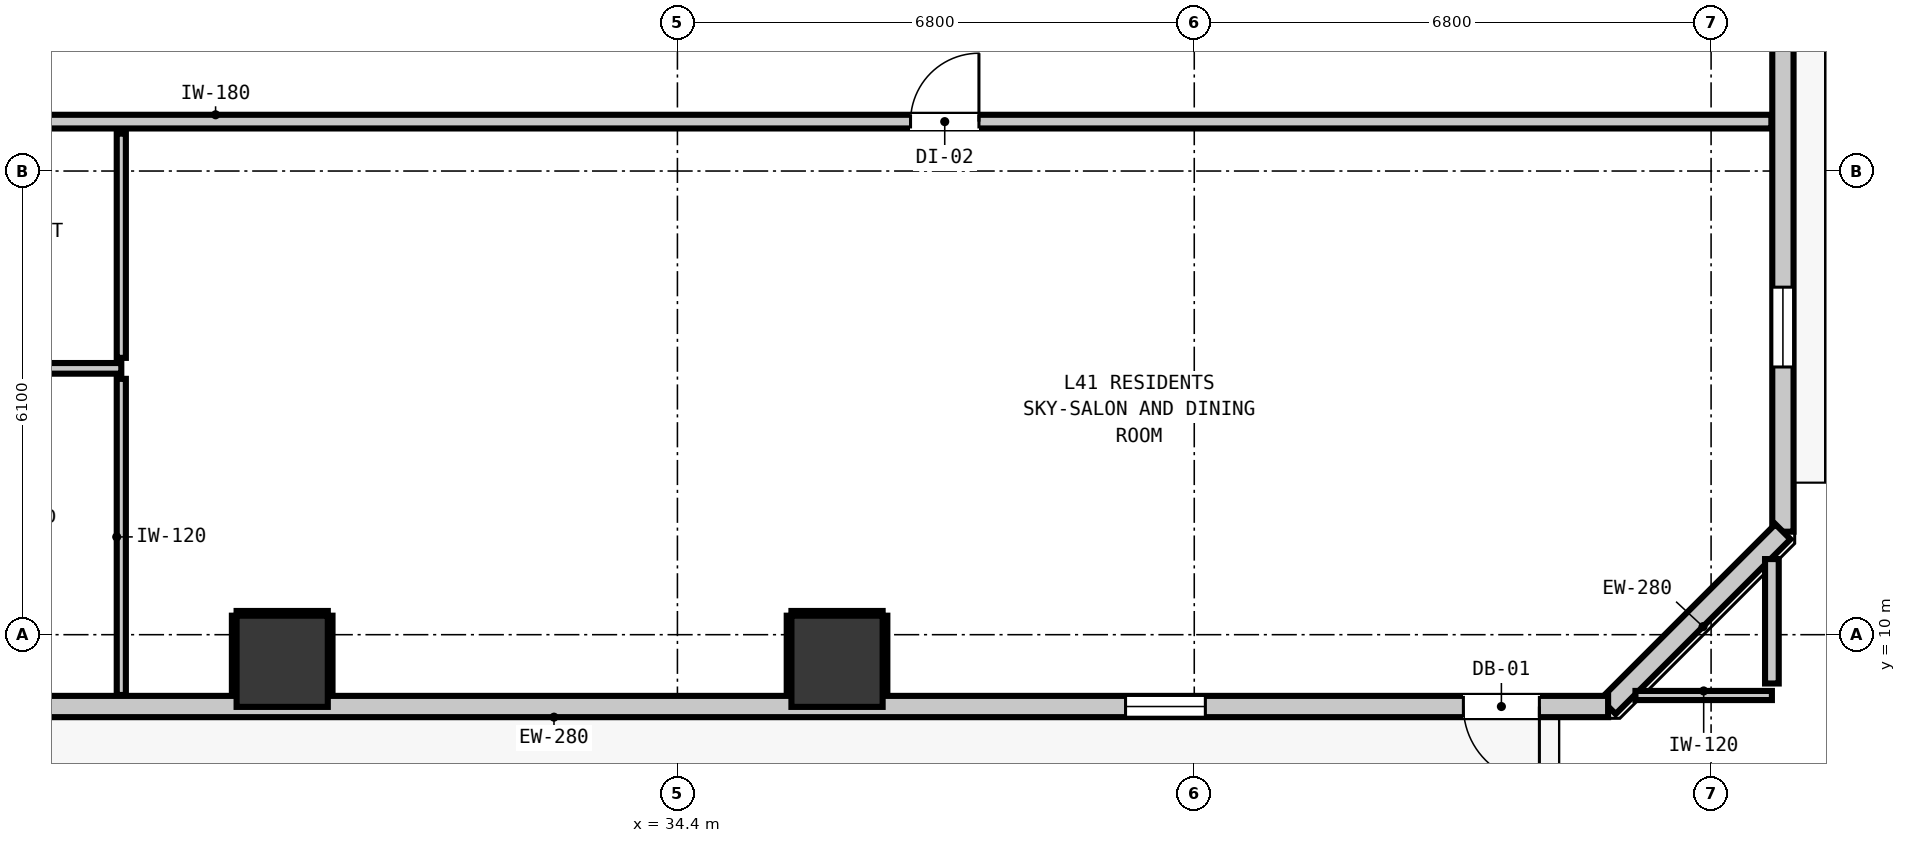
"""IFC4 building model, lengths in metres.
Left out: names, types, materials, properties, quantities, classifications, styles, units other than length and angle.
Written with IfcOpenShell. Run it as: python <this file> out.ifc"""

import sys

from ifc_helpers import new_model, si_unit, direction, frame, frame_2d, origin, origin_2d, place, context, subcontext, project, spatial, rectangle, extrude, element, fill, save


model = new_model("IFC4")
c1 = context("Model", 3, precision=1e-05, world=origin(), true_north=direction((0.0, 1.0)))
c2 = subcontext(c1, "Body", "Model", "MODEL_VIEW")
j1 = project(units=[si_unit("LENGTHUNIT", "METRE"), si_unit("PLANEANGLEUNIT", "RADIAN")], contexts=[c1])
p1 = place(None, origin())
s1 = spatial("IfcSite", under=j1, at=p1, CompositionType="ELEMENT")
p2 = place(p1, origin())
s2 = spatial("IfcBuilding", under=s1, at=p2, CompositionType="ELEMENT")
p3 = place(p2, frame((0.0, 0.0, 142.6)))
s3 = spatial("IfcBuildingStorey", under=s2, at=p3, CompositionType="ELEMENT", Elevation=142.6)
for number, where, z_axis, x_axis in (
    (1, (29.2, 9.65, 0.0), (0.0, 0.0, 1.0), (1.0, 0.0, 0.0)),
    (2, (36.5, 9.65, 0.0), (0.0, 0.0, 1.0), (1.0, 0.0, 0.0)),
):
    element("IfcColumn", number, at=place(p3, frame(where, z_axis=z_axis, x_axis=x_axis)), inside=s3, PredefinedType="COLUMN", context=c2, shape_type="SweptSolid", body=[
        extrude(rectangle(XDim=1.2, YDim=1.2, at=origin_2d()), origin(), (0.0, 0.0, 1.0), 2.9),
    ])
p4 = place(p3, frame((48.945, 43.645, 0.0), z_axis=(0.0, 0.0, 1.0), x_axis=(0.0, -1.0, 0.0)))
e3 = element("IfcWall", 3, at=p4, inside=s3, PredefinedType="STANDARD", context=c2, shape_type="SweptSolid", body=[
    extrude(rectangle(XDim=32.29, YDim=0.28, at=frame_2d((16.145, 0.0))), origin(), (0.0, 0.0, 1.0), 2.9),
])
p5 = place(p4, frame((5.467, 0.0, 0.0)))
e4 = element("IfcOpeningElement", 4, at=p5, cuts=e3, PredefinedType="OPENING", context=c2, shape_type="SweptSolid", body=[
    extrude(rectangle(XDim=1.0, YDim=2.15, at=frame_2d((0.5, 1.075))), frame((0.0, 0.15, 0.0), z_axis=(0.0, -1.0, 0.0), x_axis=(1.0, 0.0, 0.0)), (0.0, 0.0, 1.0), 0.3),
])
p6 = place(p4, frame((29.073, 0.0, 0.85)))
e5 = element("IfcOpeningElement", 5, at=p6, cuts=e3, PredefinedType="OPENING", context=c2, shape_type="SweptSolid", body=[
    extrude(rectangle(XDim=1.05, YDim=1.65, at=frame_2d((0.525, 0.825))), frame((0.0, 0.15, 0.0), z_axis=(0.0, -1.0, 0.0), x_axis=(1.0, 0.0, 0.0)), (0.0, 0.0, 1.0), 0.3),
])
p7 = place(p4, frame((0.318, 0.0, 0.85)))
e6 = element("IfcOpeningElement", 6, at=p7, cuts=e3, PredefinedType="OPENING", context=c2, shape_type="SweptSolid", body=[
    extrude(rectangle(XDim=1.05, YDim=1.65, at=frame_2d((0.525, 0.825))), frame((0.0, 0.15, 0.0), z_axis=(0.0, -1.0, 0.0), x_axis=(1.0, 0.0, 0.0)), (0.0, 0.0, 1.0), 0.3),
])
p8 = place(p4, frame((16.201, 0.0, 0.85)))
e7 = element("IfcOpeningElement", 7, at=p8, cuts=e3, PredefinedType="OPENING", context=c2, shape_type="SweptSolid", body=[
    extrude(rectangle(XDim=1.05, YDim=1.65, at=frame_2d((0.525, 0.825))), frame((0.0, 0.15, 0.0), z_axis=(0.0, -1.0, 0.0), x_axis=(1.0, 0.0, 0.0)), (0.0, 0.0, 1.0), 0.3),
])
p9 = place(p4, frame((10.57, 0.0, 0.85)))
e8 = element("IfcOpeningElement", 8, at=p9, cuts=e3, PredefinedType="OPENING", context=c2, shape_type="SweptSolid", body=[
    extrude(rectangle(XDim=1.05, YDim=1.65, at=frame_2d((0.525, 0.825))), frame((0.0, 0.15, 0.0), z_axis=(0.0, -1.0, 0.0), x_axis=(1.0, 0.0, 0.0)), (0.0, 0.0, 1.0), 0.3),
])
p10 = place(p3, frame((48.945, 11.355, 0.0), z_axis=(0.0, 0.0, 1.0), x_axis=(-0.707106781187, -0.707106781187, 0.0)))
e9 = element("IfcWall", 9, at=p10, inside=s3, PredefinedType="STANDARD", context=c2, shape_type="SweptSolid", body=[
    extrude(rectangle(XDim=3.253, YDim=0.28, at=frame_2d((1.626, 0.0))), origin(), (0.0, 0.0, 1.0), 2.9),
])
p11 = place(p3, frame((46.645, 9.055, 0.0), z_axis=(0.0, 0.0, 1.0), x_axis=(-1.0, 0.0, 0.0)))
e10 = element("IfcWall", 10, at=p11, inside=s3, PredefinedType="STANDARD", context=c2, shape_type="SweptSolid", body=[
    extrude(rectangle(XDim=35.09, YDim=0.28, at=frame_2d((17.545, 0.0))), origin(), (0.0, 0.0, 1.0), 2.9),
])
p12 = place(p11, frame((0.904, 0.0, 0.0)))
e11 = element("IfcOpeningElement", 11, at=p12, cuts=e10, PredefinedType="OPENING", context=c2, shape_type="SweptSolid", body=[
    extrude(rectangle(XDim=1.0, YDim=2.15, at=frame_2d((0.5, 1.075))), frame((0.0, 0.15, 0.0), z_axis=(0.0, -1.0, 0.0), x_axis=(1.0, 0.0, 0.0)), (0.0, 0.0, 1.0), 0.3),
])
p13 = place(p11, frame((28.48, 0.0, 0.85)))
e12 = element("IfcOpeningElement", 12, at=p13, cuts=e10, PredefinedType="OPENING", context=c2, shape_type="SweptSolid", body=[
    extrude(rectangle(XDim=1.05, YDim=1.65, at=frame_2d((0.525, 0.825))), frame((0.0, 0.15, 0.0), z_axis=(0.0, -1.0, 0.0), x_axis=(1.0, 0.0, 0.0)), (0.0, 0.0, 1.0), 0.3),
])
p14 = place(p11, frame((34.133, 0.0, 0.85)))
e13 = element("IfcOpeningElement", 13, at=p14, cuts=e10, PredefinedType="OPENING", context=c2, shape_type="SweptSolid", body=[
    extrude(rectangle(XDim=0.58, YDim=1.5, at=frame_2d((0.29, 0.75))), frame((0.0, 0.15, 0.0), z_axis=(0.0, -1.0, 0.0), x_axis=(1.0, 0.0, 0.0)), (0.0, 0.0, 1.0), 0.3),
])
p15 = place(p11, frame((21.389, 0.0, 0.85)))
e14 = element("IfcOpeningElement", 14, at=p15, cuts=e10, PredefinedType="OPENING", context=c2, shape_type="SweptSolid", body=[
    extrude(rectangle(XDim=1.05, YDim=1.65, at=frame_2d((0.525, 0.825))), frame((0.0, 0.15, 0.0), z_axis=(0.0, -1.0, 0.0), x_axis=(1.0, 0.0, 0.0)), (0.0, 0.0, 1.0), 0.3),
])
p16 = place(p11, frame((5.299, 0.0, 0.85)))
e15 = element("IfcOpeningElement", 15, at=p16, cuts=e10, PredefinedType="OPENING", context=c2, shape_type="SweptSolid", body=[
    extrude(rectangle(XDim=1.05, YDim=1.65, at=frame_2d((0.525, 0.825))), frame((0.0, 0.15, 0.0), z_axis=(0.0, -1.0, 0.0), x_axis=(1.0, 0.0, 0.0)), (0.0, 0.0, 1.0), 0.3),
])
p17 = place(p3, frame((9.407, 16.75, 0.0), z_axis=(0.0, 0.0, 1.0), x_axis=(1.0, 0.0, 0.0)))
e16 = element("IfcWall", 16, at=p17, inside=s3, PredefinedType="PARTITIONING", context=c2, shape_type="SweptSolid", body=[
    extrude(rectangle(XDim=39.386, YDim=0.18, at=frame_2d((19.693, 0.0))), origin(), (0.0, 0.0, 1.0), 2.9),
])
p18 = place(p17, frame((8.773, 0.0, 0.0)))
e17 = element("IfcOpeningElement", 17, at=p18, cuts=e16, PredefinedType="OPENING", context=c2, shape_type="SweptSolid", body=[
    extrude(rectangle(XDim=1.0, YDim=2.15, at=frame_2d((0.5, 1.075))), frame((0.0, 0.1, 0.0), z_axis=(0.0, -1.0, 0.0), x_axis=(1.0, 0.0, 0.0)), (0.0, 0.0, 1.0), 0.2),
])
p19 = place(p17, frame((28.06, 0.0, 0.0)))
e18 = element("IfcOpeningElement", 18, at=p19, cuts=e16, PredefinedType="OPENING", context=c2, shape_type="SweptSolid", body=[
    extrude(rectangle(XDim=0.9, YDim=2.1, at=frame_2d((0.45, 1.05))), frame((0.0, 0.1, 0.0), z_axis=(0.0, -1.0, 0.0), x_axis=(1.0, 0.0, 0.0)), (0.0, 0.0, 1.0), 0.2),
])
p20 = place(p3, frame((22.38, 13.504, 0.0), z_axis=(0.0, 0.0, 1.0), x_axis=(1.0, 0.0, 0.0)))
e19 = element("IfcWall", 19, at=p20, inside=s3, PredefinedType="PARTITIONING", context=c2, shape_type="SweptSolid", body=[
    extrude(rectangle(XDim=4.703, YDim=0.14, at=frame_2d((2.352, 0.0))), origin(), (0.0, 0.0, 1.0), 2.9),
])
p21 = place(p3, frame((47.005, 9.2, 0.0), z_axis=(0.0, 0.0, 1.0), x_axis=(1.0, 0.0, 0.0)))
e20 = element("IfcWall", 20, at=p21, inside=s3, PredefinedType="PARTITIONING", context=c2, shape_type="SweptSolid", body=[
    extrude(rectangle(XDim=1.795, YDim=0.12, at=frame_2d((0.897, 0.0))), origin(), (0.0, 0.0, 1.0), 2.9),
])
p22 = place(p3, frame((48.8, 9.358, 0.0), z_axis=(0.0, 0.0, 1.0), x_axis=(0.0, 1.0, 0.0)))
e21 = element("IfcWall", 21, at=p22, inside=s3, PredefinedType="PARTITIONING", context=c2, shape_type="SweptSolid", body=[
    extrude(rectangle(XDim=1.637, YDim=0.18, at=frame_2d((0.819, 0.0))), origin(), (0.0, 0.0, 1.0), 2.9),
])
p23 = place(p3, frame((27.083, 9.207, 0.0), z_axis=(0.0, 0.0, 1.0), x_axis=(0.0, 1.0, 0.0)))
e22 = element("IfcWall", 22, at=p23, inside=s3, PredefinedType="PARTITIONING", context=c2, shape_type="SweptSolid", body=[
    extrude(rectangle(XDim=4.159, YDim=0.12, at=frame_2d((2.08, 0.0))), origin(), (0.0, 0.0, 1.0), 2.9),
])
p24 = place(p3, frame((27.083, 13.642, 0.0), z_axis=(0.0, 0.0, 1.0), x_axis=(0.0, 1.0, 0.0)))
e23 = element("IfcWall", 23, at=p24, inside=s3, PredefinedType="PARTITIONING", context=c2, shape_type="SweptSolid", body=[
    extrude(rectangle(XDim=2.95, YDim=0.12, at=frame_2d((1.475, 0.0))), origin(), (0.0, 0.0, 1.0), 2.9),
])
p25 = place(p3, frame((28.6, 10.282, 0.0), z_axis=(0.0, 0.0, 1.0), x_axis=(1.0, 0.0, 0.0)))
e24 = element("IfcWall", 24, at=p25, inside=s3, PredefinedType="PARTITIONING", context=c2, shape_type="SweptSolid", body=[
    extrude(rectangle(XDim=1.2, YDim=0.06, at=frame_2d((0.6, 0.0))), origin(), (0.0, 0.0, 1.0), 1.45),
])
for number, where, z_axis, x_axis in (
    (25, (28.568, 9.21, 0.0), (0.0, 0.0, 1.0), (0.0, 1.0, 0.0)),
    (26, (29.832, 9.21, 0.0), (0.0, 0.0, 1.0), (0.0, 1.0, 0.0)),
):
    element("IfcWall", number, at=place(p3, frame(where, z_axis=z_axis, x_axis=x_axis)), inside=s3, PredefinedType="PARTITIONING", context=c2, shape_type="SweptSolid", body=[
        extrude(rectangle(XDim=1.04, YDim=0.06, at=frame_2d((0.52, 0.0))), origin(), (0.0, 0.0, 1.0), 0.905),
    ])
p26 = place(p3, frame((35.9, 10.282, 0.0), z_axis=(0.0, 0.0, 1.0), x_axis=(1.0, 0.0, 0.0)))
e27 = element("IfcWall", 27, at=p26, inside=s3, PredefinedType="PARTITIONING", context=c2, shape_type="SweptSolid", body=[
    extrude(rectangle(XDim=1.2, YDim=0.06, at=frame_2d((0.6, 0.0))), origin(), (0.0, 0.0, 1.0), 1.45),
])
for number, where, z_axis, x_axis in (
    (28, (35.868, 9.21, 0.0), (0.0, 0.0, 1.0), (0.0, 1.0, 0.0)),
    (29, (37.132, 9.21, 0.0), (0.0, 0.0, 1.0), (0.0, 1.0, 0.0)),
):
    element("IfcWall", number, at=place(p3, frame(where, z_axis=z_axis, x_axis=x_axis)), inside=s3, PredefinedType="PARTITIONING", context=c2, shape_type="SweptSolid", body=[
        extrude(rectangle(XDim=1.04, YDim=0.06, at=frame_2d((0.52, 0.0))), origin(), (0.0, 0.0, 1.0), 0.905),
    ])
p27 = place(p12, origin())
e30 = element("IfcDoor", 30, at=p27, inside=s3, OperationType="SINGLE_SWING_LEFT", PredefinedType="DOOR", context=c2, shape_type="SweptSolid", body=[
    extrude(rectangle(XDim=1.0, YDim=2.15, at=frame_2d((0.5, 1.075))), frame((0.0, 0.025, 0.0), z_axis=(0.0, -1.0, 0.0), x_axis=(1.0, 0.0, 0.0)), (0.0, 0.0, 1.0), 0.05),
])
fill(e11, e30)
p28 = place(p6, origin())
e31 = element("IfcWindow", 31, at=p28, inside=s3, PartitioningType="SINGLE_PANEL", PredefinedType="WINDOW", context=c2, shape_type="SweptSolid", body=[
    extrude(rectangle(XDim=1.05, YDim=1.65, at=frame_2d((0.525, 0.825))), frame((0.0, 0.03, 0.0), z_axis=(0.0, -1.0, 0.0), x_axis=(1.0, 0.0, 0.0)), (0.0, 0.0, 1.0), 0.06),
])
fill(e5, e31)
p29 = place(p16, origin())
e32 = element("IfcWindow", 32, at=p29, inside=s3, PartitioningType="SINGLE_PANEL", PredefinedType="WINDOW", context=c2, shape_type="SweptSolid", body=[
    extrude(rectangle(XDim=1.05, YDim=1.65, at=frame_2d((0.525, 0.825))), frame((0.0, 0.03, 0.0), z_axis=(0.0, -1.0, 0.0), x_axis=(1.0, 0.0, 0.0)), (0.0, 0.0, 1.0), 0.06),
])
fill(e15, e32)
p30 = place(p19, origin())
e33 = element("IfcDoor", 33, at=p30, inside=s3, OperationType="SINGLE_SWING_RIGHT", PredefinedType="DOOR", context=c2, shape_type="SweptSolid", body=[
    extrude(rectangle(XDim=0.9, YDim=2.1, at=frame_2d((0.45, 1.05))), frame((0.0, 0.025, 0.0), z_axis=(0.0, -1.0, 0.0), x_axis=(1.0, 0.0, 0.0)), (0.0, 0.0, 1.0), 0.05),
])
fill(e18, e33)
save(model, sys.argv[1])
